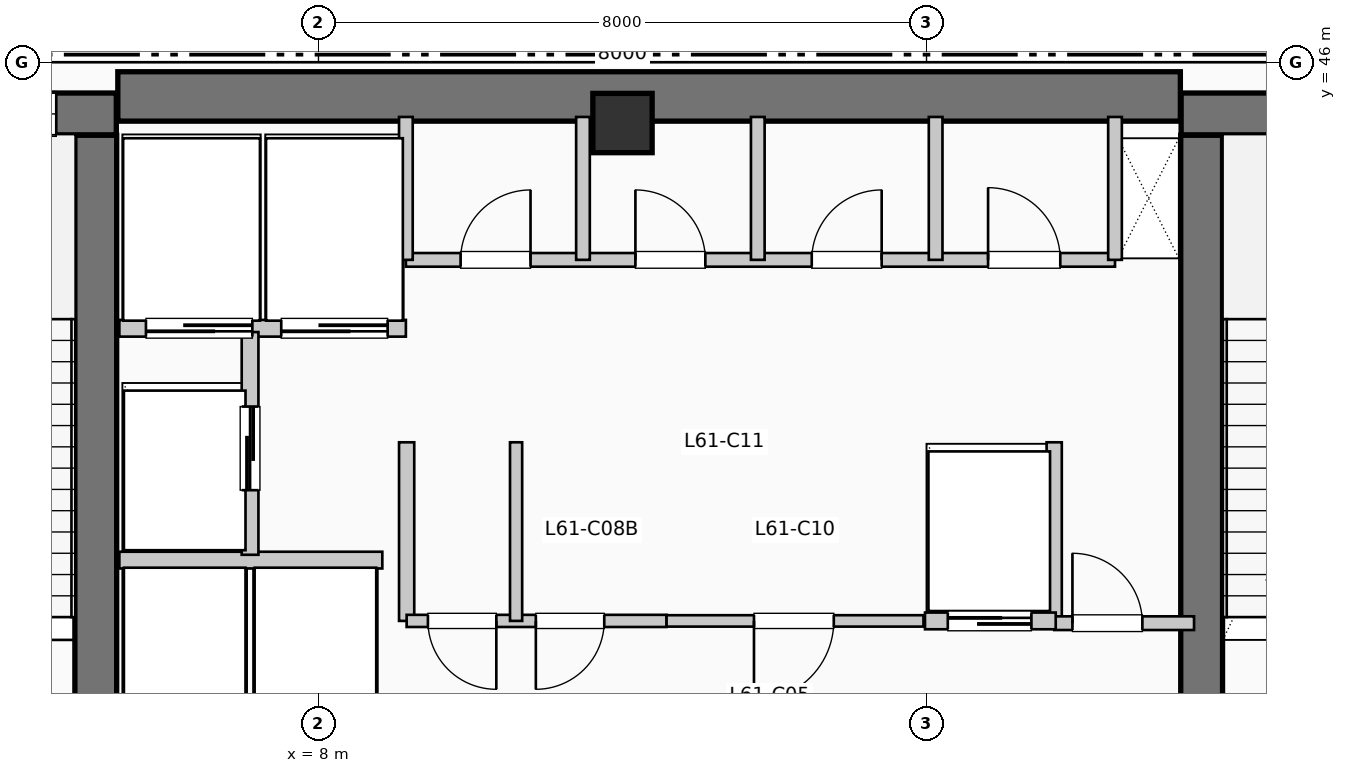
"""IFC4 building model, lengths in metres.
Left out: names, types, materials, properties, quantities, classifications, styles, units other than length and angle.
Written with IfcOpenShell. Run it as: python <this file> out.ifc"""

import sys

from ifc_helpers import new_model, si_unit, direction, frame, frame_2d, origin, origin_2d, place, context, subcontext, project, spatial, rectangle, extrude, element, fill, save


model = new_model("IFC4")
c1 = context("Model", 3, precision=1e-05, world=origin(), true_north=direction((0.0, 1.0)))
c2 = subcontext(c1, "Body", "Model", "MODEL_VIEW")
j1 = project(units=[si_unit("LENGTHUNIT", "METRE"), si_unit("PLANEANGLEUNIT", "RADIAN")], contexts=[c1])
p1 = place(None, origin())
s1 = spatial("IfcSite", under=j1, at=p1, CompositionType="ELEMENT")
p2 = place(p1, origin())
s2 = spatial("IfcBuilding", under=s1, at=p2, CompositionType="ELEMENT")
p3 = place(p2, frame((0.0, 0.0, 251.46)))
s3 = spatial("IfcBuildingStorey", under=s2, at=p3, CompositionType="ELEMENT", Elevation=251.46)
p4 = place(p3, frame((5.36, 45.55, 0.0), z_axis=(0.0, 0.0, 1.0), x_axis=(1.0, 0.0, 0.0)))
e1 = element("IfcWall", 1, at=p4, inside=s3, PredefinedType="SHEAR", context=c2, shape_type="SweptSolid", body=[
    extrude(rectangle(XDim=13.98, YDim=0.65, at=frame_2d((6.99, 0.0))), origin(), (0.0, 0.0, 1.0), 4.95),
])
p5 = place(p3, frame((5.07, 37.15, 0.0), z_axis=(0.0, 0.0, 1.0), x_axis=(0.0, 1.0, 0.0)))
e2 = element("IfcWall", 2, at=p5, inside=s3, PredefinedType="SHEAR", context=c2, shape_type="SweptSolid", body=[
    extrude(rectangle(XDim=7.89, YDim=0.55, at=frame_2d((3.945, 0.0))), origin(), (0.0, 0.0, 1.0), 4.95),
])
p6 = place(p3, frame((1.1, 45.32, 0.0), z_axis=(0.0, 0.0, 1.0), x_axis=(1.0, 0.0, 0.0)))
e3 = element("IfcWall", 3, at=p6, inside=s3, PredefinedType="SHEAR", context=c2, shape_type="SweptSolid", body=[
    extrude(rectangle(XDim=4.24, YDim=0.55, at=frame_2d((2.12, 0.0))), origin(), (0.0, 0.0, 1.0), 4.95),
])
p7 = place(p6, frame((2.05, 0.0, 1.05)))
e4 = element("IfcOpeningElement", 4, at=p7, cuts=e3, PredefinedType="OPENING", context=c2, shape_type="SweptSolid", body=[
    extrude(rectangle(XDim=1.4, YDim=1.8, at=frame_2d((0.7, 0.9))), frame((0.0, 0.285, 0.0), z_axis=(0.0, -1.0, 0.0), x_axis=(1.0, 0.0, 0.0)), (0.0, 0.0, 1.0), 0.57),
])
p8 = place(p3, frame((19.62, 37.15, 0.0), z_axis=(0.0, 0.0, 1.0), x_axis=(0.0, 1.0, 0.0)))
e5 = element("IfcWall", 5, at=p8, inside=s3, PredefinedType="SHEAR", context=c2, shape_type="SweptSolid", body=[
    extrude(rectangle(XDim=7.89, YDim=0.55, at=frame_2d((3.945, 0.0))), origin(), (0.0, 0.0, 1.0), 4.95),
])
p9 = place(p3, frame((19.35, 45.32, 0.0), z_axis=(0.0, 0.0, 1.0), x_axis=(1.0, 0.0, 0.0)))
e6 = element("IfcWall", 6, at=p9, inside=s3, PredefinedType="SHEAR", context=c2, shape_type="SweptSolid", body=[
    extrude(rectangle(XDim=3.69, YDim=0.55, at=frame_2d((1.845, 0.0))), origin(), (0.0, 0.0, 1.0), 4.95),
])
p10 = place(p9, frame((1.15, 0.0, 1.05)))
e7 = element("IfcOpeningElement", 7, at=p10, cuts=e6, PredefinedType="OPENING", context=c2, shape_type="SweptSolid", body=[
    extrude(rectangle(XDim=1.4, YDim=1.8, at=frame_2d((0.7, 0.9))), frame((0.0, 0.285, 0.0), z_axis=(0.0, -1.0, 0.0), x_axis=(1.0, 0.0, 0.0)), (0.0, 0.0, 1.0), 0.57),
])
p11 = place(p3, frame((12.0, 45.2, 0.0), z_axis=(0.0, 0.0, 1.0), x_axis=(1.0, 0.0, 0.0)))
e8 = element("IfcColumn", 8, at=p11, inside=s3, PredefinedType="COLUMN", context=c2, shape_type="SweptSolid", body=[
    extrude(rectangle(XDim=0.78, YDim=0.78, at=origin_2d()), origin(), (0.0, 0.0, 1.0), 4.95),
])
p12 = place(p3, frame((5.38, 39.45, 0.0), z_axis=(0.0, 0.0, 1.0), x_axis=(1.0, 0.0, 0.0)))
e9 = element("IfcWall", 9, at=p12, inside=s3, PredefinedType="PARTITIONING", context=c2, shape_type="SweptSolid", body=[
    extrude(rectangle(XDim=3.46, YDim=0.22, at=frame_2d((1.73, 0.0))), origin(), (0.0, 0.0, 1.0), 4.7),
])
p13 = place(p3, frame((5.38, 42.5, 0.0), z_axis=(0.0, 0.0, 1.0), x_axis=(1.0, 0.0, 0.0)))
e10 = element("IfcWall", 10, at=p13, inside=s3, PredefinedType="PARTITIONING", context=c2, shape_type="SweptSolid", body=[
    extrude(rectangle(XDim=3.77, YDim=0.22, at=frame_2d((1.885, 0.0))), origin(), (0.0, 0.0, 1.0), 4.7),
])
p14 = place(p13, frame((1.75, 0.0, 0.0), z_axis=(0.0, 0.0, 1.0), x_axis=(-1.0, 0.0, 0.0)))
e11 = element("IfcOpeningElement", 11, at=p14, cuts=e10, PredefinedType="OPENING", context=c2, shape_type="SweptSolid", body=[
    extrude(rectangle(XDim=1.4, YDim=2.2, at=frame_2d((0.7, 1.1))), frame((0.0, 0.12, 0.0), z_axis=(0.0, -1.0, 0.0), x_axis=(1.0, 0.0, 0.0)), (0.0, 0.0, 1.0), 0.24),
])
p15 = place(p13, frame((3.53, 0.0, 0.0), z_axis=(0.0, 0.0, 1.0), x_axis=(-1.0, 0.0, 0.0)))
e12 = element("IfcOpeningElement", 12, at=p15, cuts=e10, PredefinedType="OPENING", context=c2, shape_type="SweptSolid", body=[
    extrude(rectangle(XDim=1.4, YDim=2.2, at=frame_2d((0.7, 1.1))), frame((0.0, 0.12, 0.0), z_axis=(0.0, -1.0, 0.0), x_axis=(1.0, 0.0, 0.0)), (0.0, 0.0, 1.0), 0.24),
])
p16 = place(p3, frame((7.1, 39.52, 0.0), z_axis=(0.0, 0.0, 1.0), x_axis=(0.0, 1.0, 0.0)))
e13 = element("IfcWall", 13, at=p16, inside=s3, PredefinedType="PARTITIONING", context=c2, shape_type="SweptSolid", body=[
    extrude(rectangle(XDim=2.93, YDim=0.22, at=frame_2d((1.465, 0.0))), origin(), (0.0, 0.0, 1.0), 4.7),
])
p17 = place(p16, frame((0.85, 0.0, 0.0)))
e14 = element("IfcOpeningElement", 14, at=p17, cuts=e13, PredefinedType="OPENING", context=c2, shape_type="SweptSolid", body=[
    extrude(rectangle(XDim=1.1, YDim=2.2, at=frame_2d((0.55, 1.1))), frame((0.0, 0.12, 0.0), z_axis=(0.0, -1.0, 0.0), x_axis=(1.0, 0.0, 0.0)), (0.0, 0.0, 1.0), 0.24),
])
for number, where, z_axis, x_axis in (
    (15, (9.16, 38.65, 0.0), (0.0, 0.0, 1.0), (0.0, 1.0, 0.0)),
    (16, (17.68, 38.65, 0.0), (0.0, 0.0, 1.0), (0.0, 1.0, 0.0)),
):
    element("IfcWall", number, at=place(p3, frame(where, z_axis=z_axis, x_axis=x_axis)), inside=s3, PredefinedType="PARTITIONING", context=c2, shape_type="SweptSolid", body=[
        extrude(rectangle(XDim=2.35, YDim=0.2, at=frame_2d((1.175, 0.0))), origin(), (0.0, 0.0, 1.0), 4.7),
    ])
p18 = place(p3, frame((17.68, 38.62, 0.0), z_axis=(0.0, 0.0, 1.0), x_axis=(1.0, 0.0, 0.0)))
e17 = element("IfcWall", 17, at=p18, inside=s3, PredefinedType="PARTITIONING", context=c2, shape_type="SweptSolid", body=[
    extrude(rectangle(XDim=1.84, YDim=0.18, at=frame_2d((0.92, 0.0))), origin(), (0.0, 0.0, 1.0), 4.7),
])
p19 = place(p18, frame((0.24, 0.0, 0.0)))
e18 = element("IfcOpeningElement", 18, at=p19, cuts=e17, PredefinedType="OPENING", context=c2, shape_type="SweptSolid", body=[
    extrude(rectangle(XDim=0.92, YDim=2.1, at=frame_2d((0.46, 1.05))), frame((0.0, 0.1, 0.0), z_axis=(0.0, -1.0, 0.0), x_axis=(1.0, 0.0, 0.0)), (0.0, 0.0, 1.0), 0.2),
])
p20 = place(p3, frame((9.16, 38.65, 0.0), z_axis=(0.0, 0.0, 1.0), x_axis=(1.0, 0.0, 0.0)))
e19 = element("IfcWall", 19, at=p20, inside=s3, PredefinedType="PARTITIONING", context=c2, shape_type="SweptSolid", body=[
    extrude(rectangle(XDim=3.42, YDim=0.16, at=frame_2d((1.71, 0.0))), origin(), (0.0, 0.0, 1.0), 4.7),
])
p21 = place(p20, frame((1.18, 0.0, 0.0), z_axis=(0.0, 0.0, 1.0), x_axis=(-1.0, 0.0, 0.0)))
e20 = element("IfcOpeningElement", 20, at=p21, cuts=e19, PredefinedType="OPENING", context=c2, shape_type="SweptSolid", body=[
    extrude(rectangle(XDim=0.9, YDim=2.15, at=frame_2d((0.45, 1.075))), frame((0.0, 0.09, 0.0), z_axis=(0.0, -1.0, 0.0), x_axis=(1.0, 0.0, 0.0)), (0.0, 0.0, 1.0), 0.18),
])
p22 = place(p20, frame((2.6, 0.0, 0.0), z_axis=(0.0, 0.0, 1.0), x_axis=(-1.0, 0.0, 0.0)))
e21 = element("IfcOpeningElement", 21, at=p22, cuts=e19, PredefinedType="OPENING", context=c2, shape_type="SweptSolid", body=[
    extrude(rectangle(XDim=0.9, YDim=2.15, at=frame_2d((0.45, 1.075))), frame((0.0, 0.09, 0.0), z_axis=(0.0, -1.0, 0.0), x_axis=(1.0, 0.0, 0.0)), (0.0, 0.0, 1.0), 0.18),
])
p23 = place(p3, frame((10.6, 38.65, 0.0), z_axis=(0.0, 0.0, 1.0), x_axis=(0.0, 1.0, 0.0)))
e22 = element("IfcWall", 22, at=p23, inside=s3, PredefinedType="PARTITIONING", context=c2, shape_type="SweptSolid", body=[
    extrude(rectangle(XDim=2.35, YDim=0.16, at=frame_2d((1.175, 0.0))), origin(), (0.0, 0.0, 1.0), 4.7),
])
p24 = place(p3, frame((12.58, 38.65, 0.0), z_axis=(0.0, 0.0, 1.0), x_axis=(1.0, 0.0, 0.0)))
e23 = element("IfcWall", 23, at=p24, inside=s3, PredefinedType="PARTITIONING", context=c2, shape_type="SweptSolid", body=[
    extrude(rectangle(XDim=3.38, YDim=0.15, at=frame_2d((1.69, 0.0))), origin(), (0.0, 0.0, 1.0), 4.7),
])
p25 = place(p24, frame((2.2, 0.0, 0.0), z_axis=(0.0, 0.0, 1.0), x_axis=(-1.0, 0.0, 0.0)))
e24 = element("IfcOpeningElement", 24, at=p25, cuts=e23, PredefinedType="OPENING", context=c2, shape_type="SweptSolid", body=[
    extrude(rectangle(XDim=1.05, YDim=2.15, at=frame_2d((0.525, 1.075))), frame((0.0, 0.085, 0.0), z_axis=(0.0, -1.0, 0.0), x_axis=(1.0, 0.0, 0.0)), (0.0, 0.0, 1.0), 0.17),
])
p26 = place(p3, frame((15.98, 38.65, 0.0), z_axis=(0.0, 0.0, 1.0), x_axis=(1.0, 0.0, 0.0)))
e25 = element("IfcWall", 25, at=p26, inside=s3, PredefinedType="PARTITIONING", context=c2, shape_type="SweptSolid", body=[
    extrude(rectangle(XDim=1.72, YDim=0.22, at=frame_2d((0.86, 0.0))), origin(), (0.0, 0.0, 1.0), 4.7),
])
p27 = place(p26, frame((0.3, 0.0, 0.0)))
e26 = element("IfcOpeningElement", 26, at=p27, cuts=e25, PredefinedType="OPENING", context=c2, shape_type="SweptSolid", body=[
    extrude(rectangle(XDim=1.1, YDim=2.2, at=frame_2d((0.55, 1.1))), frame((0.0, 0.12, 0.0), z_axis=(0.0, -1.0, 0.0), x_axis=(1.0, 0.0, 0.0)), (0.0, 0.0, 1.0), 0.24),
])
p28 = place(p3, frame((9.15, 43.4, 0.0), z_axis=(0.0, 0.0, 1.0), x_axis=(1.0, 0.0, 0.0)))
e27 = element("IfcWall", 27, at=p28, inside=s3, PredefinedType="PLUMBINGWALL", context=c2, shape_type="SweptSolid", body=[
    extrude(rectangle(XDim=9.33, YDim=0.18, at=frame_2d((4.665, 0.0))), origin(), (0.0, 0.0, 1.0), 4.7),
])
p29 = place(p28, frame((0.72, 0.0, 0.0)))
e28 = element("IfcOpeningElement", 28, at=p29, cuts=e27, PredefinedType="OPENING", context=c2, shape_type="SweptSolid", body=[
    extrude(rectangle(XDim=0.92, YDim=2.1, at=frame_2d((0.46, 1.05))), frame((0.0, 0.1, 0.0), z_axis=(0.0, -1.0, 0.0), x_axis=(1.0, 0.0, 0.0)), (0.0, 0.0, 1.0), 0.2),
])
p30 = place(p28, frame((3.02, 0.0, 0.0)))
e29 = element("IfcOpeningElement", 29, at=p30, cuts=e27, PredefinedType="OPENING", context=c2, shape_type="SweptSolid", body=[
    extrude(rectangle(XDim=0.92, YDim=2.1, at=frame_2d((0.46, 1.05))), frame((0.0, 0.1, 0.0), z_axis=(0.0, -1.0, 0.0), x_axis=(1.0, 0.0, 0.0)), (0.0, 0.0, 1.0), 0.2),
])
p31 = place(p28, frame((5.34, 0.0, 0.0)))
e30 = element("IfcOpeningElement", 30, at=p31, cuts=e27, PredefinedType="OPENING", context=c2, shape_type="SweptSolid", body=[
    extrude(rectangle(XDim=0.92, YDim=2.1, at=frame_2d((0.46, 1.05))), frame((0.0, 0.1, 0.0), z_axis=(0.0, -1.0, 0.0), x_axis=(1.0, 0.0, 0.0)), (0.0, 0.0, 1.0), 0.2),
])
p32 = place(p28, frame((7.66, 0.0, 0.0)))
e31 = element("IfcOpeningElement", 31, at=p32, cuts=e27, PredefinedType="OPENING", context=c2, shape_type="SweptSolid", body=[
    extrude(rectangle(XDim=0.95, YDim=2.1, at=frame_2d((0.475, 1.05))), frame((0.0, 0.1, 0.0), z_axis=(0.0, -1.0, 0.0), x_axis=(1.0, 0.0, 0.0)), (0.0, 0.0, 1.0), 0.2),
])
for number, where, z_axis, x_axis in (
    (32, (9.15, 43.4, 0.0), (0.0, 0.0, 1.0), (0.0, 1.0, 0.0)),
    (33, (18.48, 43.4, 0.0), (0.0, 0.0, 1.0), (0.0, 1.0, 0.0)),
    (34, (11.48, 43.4, 0.0), (0.0, 0.0, 1.0), (0.0, 1.0, 0.0)),
    (35, (13.78, 43.4, 0.0), (0.0, 0.0, 1.0), (0.0, 1.0, 0.0)),
    (36, (16.12, 43.4, 0.0), (0.0, 0.0, 1.0), (0.0, 1.0, 0.0)),
):
    element("IfcWall", number, at=place(p3, frame(where, z_axis=z_axis, x_axis=x_axis)), inside=s3, PredefinedType="PLUMBINGWALL", context=c2, shape_type="SweptSolid", body=[
        extrude(rectangle(XDim=1.88, YDim=0.18, at=frame_2d((0.94, 0.0))), origin(), (0.0, 0.0, 1.0), 4.7),
    ])
p33 = place(p7, origin())
e37 = element("IfcWindow", 37, at=p33, inside=s3, PartitioningType="SINGLE_PANEL", PredefinedType="WINDOW", context=c2, shape_type="SweptSolid", body=[
    extrude(rectangle(XDim=1.4, YDim=1.8, at=frame_2d((0.7, 0.9))), frame((0.0, 0.03, 0.0), z_axis=(0.0, -1.0, 0.0), x_axis=(1.0, 0.0, 0.0)), (0.0, 0.0, 1.0), 0.06),
])
fill(e4, e37)
p34 = place(p14, origin())
e38 = element("IfcDoor", 38, at=p34, inside=s3, OperationType="SLIDING_TO_LEFT", PredefinedType="DOOR", context=c2, shape_type="SweptSolid", body=[
    extrude(rectangle(XDim=1.4, YDim=2.2, at=frame_2d((0.7, 1.1))), frame((0.0, 0.025, 0.0), z_axis=(0.0, -1.0, 0.0), x_axis=(1.0, 0.0, 0.0)), (0.0, 0.0, 1.0), 0.05),
])
fill(e11, e38)
p35 = place(p15, origin())
e39 = element("IfcDoor", 39, at=p35, inside=s3, OperationType="SLIDING_TO_LEFT", PredefinedType="DOOR", context=c2, shape_type="SweptSolid", body=[
    extrude(rectangle(XDim=1.4, YDim=2.2, at=frame_2d((0.7, 1.1))), frame((0.0, 0.025, 0.0), z_axis=(0.0, -1.0, 0.0), x_axis=(1.0, 0.0, 0.0)), (0.0, 0.0, 1.0), 0.05),
])
fill(e12, e39)
p36 = place(p17, origin())
e40 = element("IfcDoor", 40, at=p36, inside=s3, OperationType="SLIDING_TO_LEFT", PredefinedType="DOOR", context=c2, shape_type="SweptSolid", body=[
    extrude(rectangle(XDim=1.1, YDim=2.2, at=frame_2d((0.55, 1.1))), frame((0.0, 0.025, 0.0), z_axis=(0.0, -1.0, 0.0), x_axis=(1.0, 0.0, 0.0)), (0.0, 0.0, 1.0), 0.05),
])
fill(e14, e40)
p37 = place(p19, origin())
e41 = element("IfcDoor", 41, at=p37, inside=s3, OperationType="SINGLE_SWING_LEFT", PredefinedType="DOOR", context=c2, shape_type="SweptSolid", body=[
    extrude(rectangle(XDim=0.92, YDim=2.1, at=frame_2d((0.46, 1.05))), frame((0.0, 0.025, 0.0), z_axis=(0.0, -1.0, 0.0), x_axis=(1.0, 0.0, 0.0)), (0.0, 0.0, 1.0), 0.05),
])
fill(e18, e41)
p38 = place(p21, origin())
e42 = element("IfcDoor", 42, at=p38, inside=s3, OperationType="SINGLE_SWING_RIGHT", PredefinedType="DOOR", context=c2, shape_type="SweptSolid", body=[
    extrude(rectangle(XDim=0.9, YDim=2.15, at=frame_2d((0.45, 1.075))), frame((0.0, 0.025, 0.0), z_axis=(0.0, -1.0, 0.0), x_axis=(1.0, 0.0, 0.0)), (0.0, 0.0, 1.0), 0.05),
])
fill(e20, e42)
p39 = place(p22, origin())
e43 = element("IfcDoor", 43, at=p39, inside=s3, OperationType="SINGLE_SWING_LEFT", PredefinedType="DOOR", context=c2, shape_type="SweptSolid", body=[
    extrude(rectangle(XDim=0.9, YDim=2.15, at=frame_2d((0.45, 1.075))), frame((0.0, 0.025, 0.0), z_axis=(0.0, -1.0, 0.0), x_axis=(1.0, 0.0, 0.0)), (0.0, 0.0, 1.0), 0.05),
])
fill(e21, e43)
p40 = place(p25, origin())
e44 = element("IfcDoor", 44, at=p40, inside=s3, OperationType="SINGLE_SWING_LEFT", PredefinedType="DOOR", context=c2, shape_type="SweptSolid", body=[
    extrude(rectangle(XDim=1.05, YDim=2.15, at=frame_2d((0.525, 1.075))), frame((0.0, 0.025, 0.0), z_axis=(0.0, -1.0, 0.0), x_axis=(1.0, 0.0, 0.0)), (0.0, 0.0, 1.0), 0.05),
])
fill(e24, e44)
p41 = place(p27, origin())
e45 = element("IfcDoor", 45, at=p41, inside=s3, OperationType="SLIDING_TO_LEFT", PredefinedType="DOOR", context=c2, shape_type="SweptSolid", body=[
    extrude(rectangle(XDim=1.1, YDim=2.2, at=frame_2d((0.55, 1.1))), frame((0.0, 0.025, 0.0), z_axis=(0.0, -1.0, 0.0), x_axis=(1.0, 0.0, 0.0)), (0.0, 0.0, 1.0), 0.05),
])
fill(e26, e45)
p42 = place(p29, origin())
e46 = element("IfcDoor", 46, at=p42, inside=s3, OperationType="SINGLE_SWING_RIGHT", PredefinedType="DOOR", context=c2, shape_type="SweptSolid", body=[
    extrude(rectangle(XDim=0.92, YDim=2.1, at=frame_2d((0.46, 1.05))), frame((0.0, 0.025, 0.0), z_axis=(0.0, -1.0, 0.0), x_axis=(1.0, 0.0, 0.0)), (0.0, 0.0, 1.0), 0.05),
])
fill(e28, e46)
p43 = place(p30, origin())
e47 = element("IfcDoor", 47, at=p43, inside=s3, OperationType="SINGLE_SWING_LEFT", PredefinedType="DOOR", context=c2, shape_type="SweptSolid", body=[
    extrude(rectangle(XDim=0.92, YDim=2.1, at=frame_2d((0.46, 1.05))), frame((0.0, 0.025, 0.0), z_axis=(0.0, -1.0, 0.0), x_axis=(1.0, 0.0, 0.0)), (0.0, 0.0, 1.0), 0.05),
])
fill(e29, e47)
p44 = place(p31, origin())
e48 = element("IfcDoor", 48, at=p44, inside=s3, OperationType="SINGLE_SWING_RIGHT", PredefinedType="DOOR", context=c2, shape_type="SweptSolid", body=[
    extrude(rectangle(XDim=0.92, YDim=2.1, at=frame_2d((0.46, 1.05))), frame((0.0, 0.025, 0.0), z_axis=(0.0, -1.0, 0.0), x_axis=(1.0, 0.0, 0.0)), (0.0, 0.0, 1.0), 0.05),
])
fill(e30, e48)
p45 = place(p32, origin())
e49 = element("IfcDoor", 49, at=p45, inside=s3, OperationType="SINGLE_SWING_LEFT", PredefinedType="DOOR", context=c2, shape_type="SweptSolid", body=[
    extrude(rectangle(XDim=0.95, YDim=2.1, at=frame_2d((0.475, 1.05))), frame((0.0, 0.025, 0.0), z_axis=(0.0, -1.0, 0.0), x_axis=(1.0, 0.0, 0.0)), (0.0, 0.0, 1.0), 0.05),
])
fill(e31, e49)
save(model, sys.argv[1])
